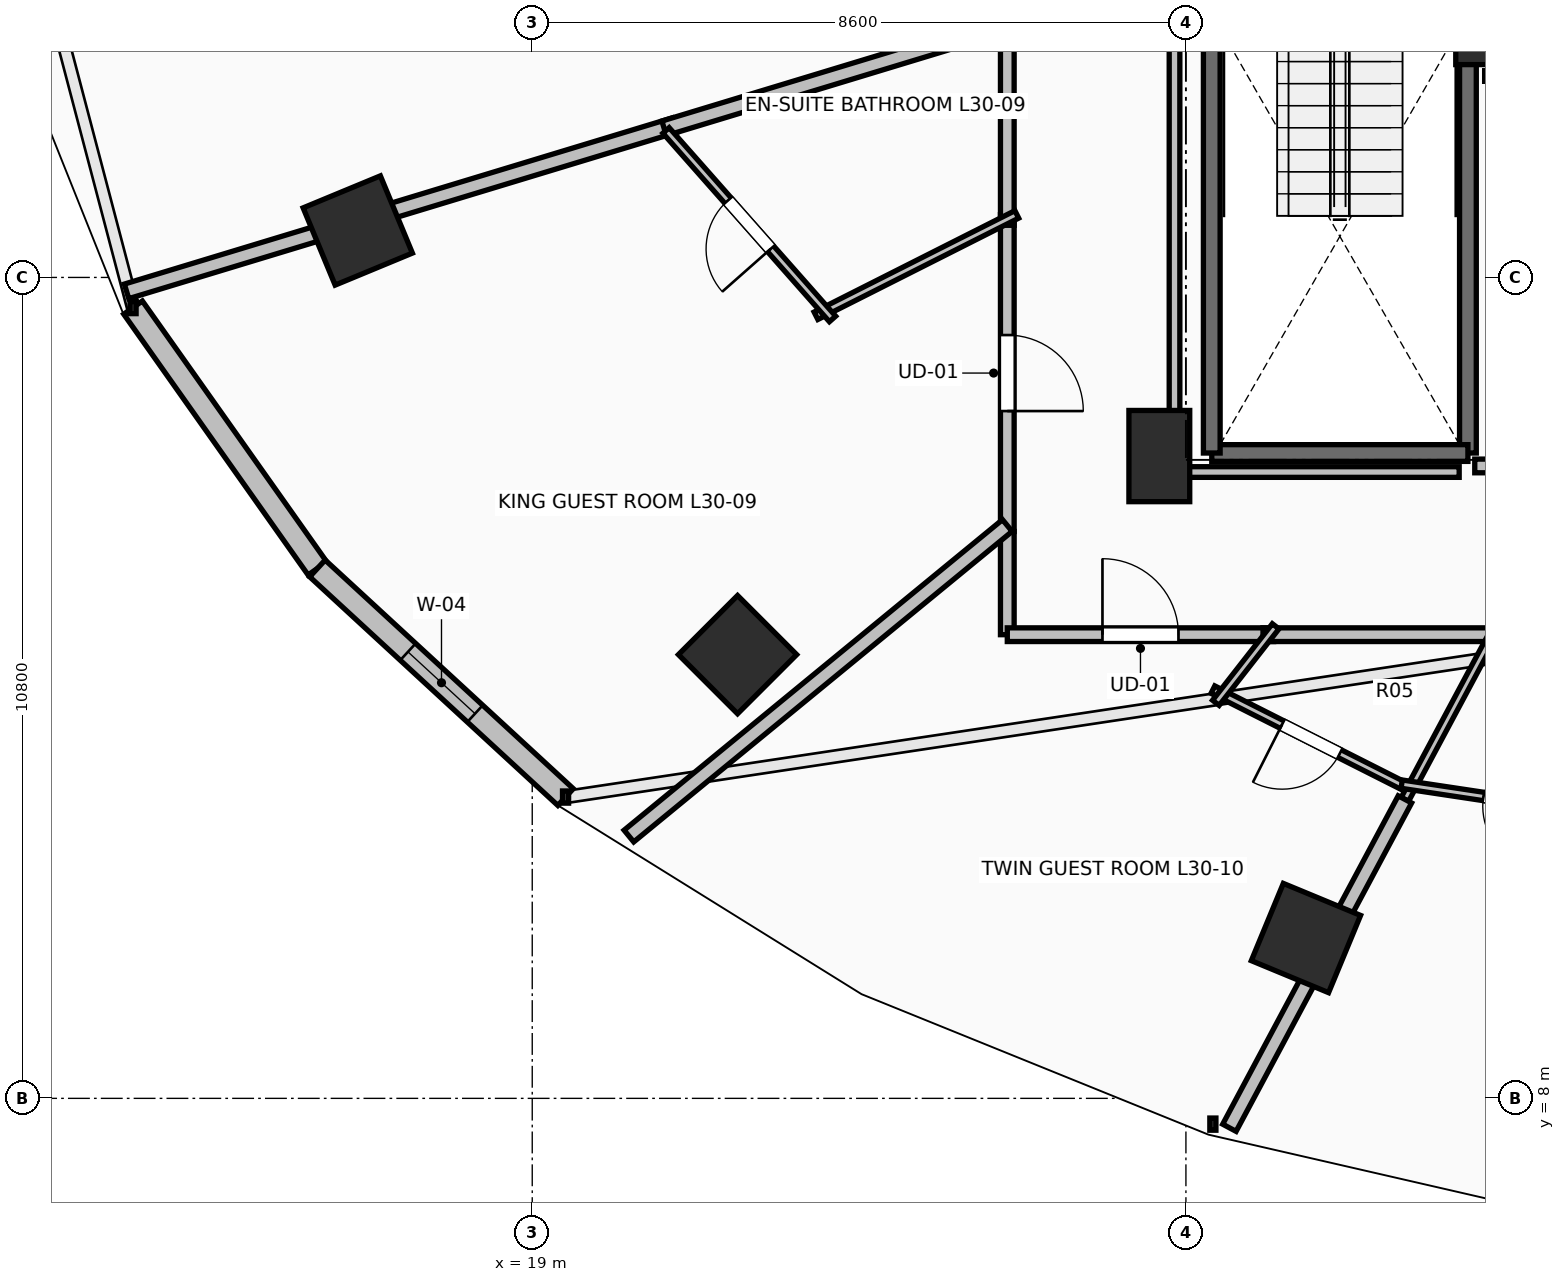
"""IFC4 building model, lengths in metres.
Left out: names, types, materials, properties, quantities, classifications, styles, units other than length and angle.
Written with IfcOpenShell. Run it as: python <this file> out.ifc"""

import sys

from ifc_helpers import new_model, si_unit, direction, frame, frame_2d, origin, origin_2d, place, context, subcontext, project, spatial, rectangle, extrude, element, fill, save


model = new_model("IFC4")
c1 = context("Model", 3, precision=1e-05, world=origin(), true_north=direction((0.0, 1.0)))
c2 = subcontext(c1, "Body", "Model", "MODEL_VIEW")
j1 = project(units=[si_unit("LENGTHUNIT", "METRE"), si_unit("PLANEANGLEUNIT", "RADIAN")], contexts=[c1])
p1 = place(None, origin())
s1 = spatial("IfcSite", under=j1, at=p1, CompositionType="ELEMENT")
p2 = place(p1, origin())
s2 = spatial("IfcBuilding", under=s1, at=p2, CompositionType="ELEMENT")
p3 = place(p2, frame((0.0, 0.0, 113.8)))
s3 = spatial("IfcBuildingStorey", under=s2, at=p3, CompositionType="ELEMENT", Elevation=113.8)
for number, where, z_axis, x_axis in (
    (1, (16.705, 19.418, 0.0), (0.0, 0.0, 1.0), (-0.924, -0.383, 0.0)),
    (2, (21.701, 13.838, 0.0), (0.0, 0.0, 1.0), (-0.707, -0.707, 0.0)),
    (3, (29.179, 10.109, 0.0), (0.0, 0.0, 1.0), (-0.383, -0.924, 0.0)),
):
    element("IfcColumn", number, at=place(p3, frame(where, z_axis=z_axis, x_axis=x_axis)), inside=s3, PredefinedType="COLUMN", context=c2, shape_type="SweptSolid", body=[
        extrude(rectangle(XDim=1.1, YDim=1.1, at=origin_2d()), origin(), (0.0, 0.0, 1.0), 3.5),
    ])
for number, where, z_axis, x_axis in (
    (4, (27.25, 16.45, 0.0), (0.0, 0.0, 1.0), (1.0, 0.0, 0.0)),
    (5, (31.55, 22.2, 0.0), (0.0, 0.0, 1.0), (1.0, 0.0, 0.0)),
):
    element("IfcColumn", number, at=place(p3, frame(where, z_axis=z_axis, x_axis=x_axis)), inside=s3, PredefinedType="PILASTER", context=c2, shape_type="SweptSolid", body=[
        extrude(rectangle(XDim=0.8, YDim=1.2, at=origin_2d()), origin(), (0.0, 0.0, 1.0), 3.5),
    ])
p4 = place(p3, frame((13.748, 18.404, 0.0), z_axis=(0.0, 0.0, 1.0), x_axis=(0.57716435238, -0.81662801222, 0.0)))
e6 = element("IfcWall", 6, at=p4, inside=s3, PredefinedType="STANDARD", context=c2, shape_type="SweptSolid", body=[
    extrude(rectangle(XDim=4.202, YDim=0.3, at=frame_2d((2.101, 0.0))), origin(), (0.0, 0.0, 1.0), 3.24),
])
p5 = place(p3, frame((16.174, 14.972, 0.0), z_axis=(0.0, 0.0, 1.0), x_axis=(0.735416718093, -0.677615119924, 0.0)))
e7 = element("IfcWall", 7, at=p5, inside=s3, PredefinedType="STANDARD", context=c2, shape_type="SweptSolid", body=[
    extrude(rectangle(XDim=4.439, YDim=0.3, at=frame_2d((2.22, 0.0))), origin(), (0.0, 0.0, 1.0), 3.24),
])
p6 = place(p5, frame((1.619, 0.0, 0.85)))
e8 = element("IfcOpeningElement", 8, at=p6, cuts=e7, PredefinedType="OPENING", context=c2, shape_type="SweptSolid", body=[
    extrude(rectangle(XDim=1.2, YDim=1.95, at=frame_2d((0.6, 0.975))), frame((0.0, 0.165, 0.0), z_axis=(0.0, -1.0, 0.0), x_axis=(1.0, 0.0, 0.0)), (0.0, 0.0, 1.0), 0.33),
])
p7 = place(p3, frame((31.31, 23.91, 0.0), z_axis=(0.0, 0.0, 1.0), x_axis=(0.0, -1.0, 0.0)))
e9 = element("IfcWall", 9, at=p7, inside=s3, PredefinedType="SOLIDWALL", context=c2, shape_type="SweptSolid", body=[
    extrude(rectangle(XDim=7.42, YDim=0.22, at=frame_2d((3.71, 0.0))), origin(), (0.0, 0.0, 1.0), 3.24),
])
p8 = place(p3, frame((31.31, 16.49, 0.0), z_axis=(0.0, 0.0, 1.0), x_axis=(-1.0, 0.0, 0.0)))
e10 = element("IfcWall", 10, at=p8, inside=s3, PredefinedType="SOLIDWALL", context=c2, shape_type="SweptSolid", body=[
    extrude(rectangle(XDim=3.37, YDim=0.22, at=frame_2d((1.685, 0.0))), origin(), (0.0, 0.0, 1.0), 3.24),
])
p9 = place(p3, frame((27.94, 16.49, 0.0), z_axis=(0.0, 0.0, 1.0), x_axis=(0.0, 1.0, 0.0)))
e11 = element("IfcWall", 11, at=p9, inside=s3, PredefinedType="SOLIDWALL", context=c2, shape_type="SweptSolid", body=[
    extrude(rectangle(XDim=7.42, YDim=0.22, at=frame_2d((3.71, 0.0))), origin(), (0.0, 0.0, 1.0), 3.24),
])
p10 = place(p3, frame((31.4, 16.32, 0.0), z_axis=(0.0, 0.0, 1.0), x_axis=(1.0, 0.0, 0.0)))
e12 = element("IfcWall", 12, at=p10, inside=s3, PredefinedType="PARTITIONING", context=c2, shape_type="SweptSolid", body=[
    extrude(rectangle(XDim=3.65, YDim=0.18, at=frame_2d((1.825, 0.0))), origin(), (0.0, 0.0, 1.0), 3.24),
])
p11 = place(p10, frame((1.4, 0.0, 0.0)))
e13 = element("IfcOpeningElement", 13, at=p11, cuts=e12, PredefinedType="OPENING", context=c2, shape_type="SweptSolid", body=[
    extrude(rectangle(XDim=0.85, YDim=2.1, at=frame_2d((0.425, 1.05))), frame((0.0, 0.105, 0.0), z_axis=(0.0, -1.0, 0.0), x_axis=(1.0, 0.0, 0.0)), (0.0, 0.0, 1.0), 0.21),
])
p12 = place(p3, frame((25.25, 19.626, 0.0), z_axis=(0.0, 0.0, 1.0), x_axis=(0.0, -1.0, 0.0)))
e14 = element("IfcWall", 14, at=p12, inside=s3, PredefinedType="PARTITIONING", context=c2, shape_type="SweptSolid", body=[
    extrude(rectangle(XDim=4.168, YDim=0.18, at=frame_2d((2.084, 0.0))), origin(), (0.0, 0.0, 1.0), 2.432),
])
p13 = place(p12, frame((1.584, 0.0, 0.0)))
e15 = element("IfcOpeningElement", 15, at=p13, cuts=e14, PredefinedType="OPENING", context=c2, shape_type="SweptSolid", body=[
    extrude(rectangle(XDim=1.0, YDim=2.15, at=frame_2d((0.5, 1.075))), frame((0.0, 0.105, 0.0), z_axis=(0.0, -1.0, 0.0), x_axis=(1.0, 0.0, 0.0)), (0.0, 0.0, 1.0), 0.21),
])
p14 = place(p3, frame((25.25, 22.209, 0.0), z_axis=(0.0, 0.0, 1.0), x_axis=(0.0, -1.0, 0.0)))
e16 = element("IfcWall", 16, at=p14, inside=s3, PredefinedType="PARTITIONING", context=c2, shape_type="SweptSolid", body=[
    extrude(rectangle(XDim=2.723, YDim=0.18, at=frame_2d((1.361, 0.0))), origin(), (0.0, 0.0, 1.0), 3.24),
])
p15 = place(p3, frame((25.25, 15.458, 0.0), z_axis=(0.0, 0.0, 1.0), x_axis=(0.0, -1.0, 0.0)))
e17 = element("IfcWall", 17, at=p15, inside=s3, PredefinedType="PARTITIONING", context=c2, shape_type="SweptSolid", body=[
    extrude(rectangle(XDim=1.358, YDim=0.18, at=frame_2d((0.679, 0.0))), origin(), (0.0, 0.0, 1.0), 2.432),
])
p16 = place(p3, frame((25.25, 14.1, 0.0), z_axis=(0.0, 0.0, 1.0), x_axis=(1.0, 0.0, 0.0)))
e18 = element("IfcWall", 18, at=p16, inside=s3, PredefinedType="PARTITIONING", context=c2, shape_type="SweptSolid", body=[
    extrude(rectangle(XDim=3.504, YDim=0.18, at=frame_2d((1.752, 0.0))), origin(), (0.0, 0.0, 1.0), 2.432),
])
p17 = place(p16, frame((1.252, 0.0, 0.0)))
e19 = element("IfcOpeningElement", 19, at=p17, cuts=e18, PredefinedType="OPENING", context=c2, shape_type="SweptSolid", body=[
    extrude(rectangle(XDim=1.0, YDim=2.15, at=frame_2d((0.5, 1.075))), frame((0.0, 0.105, 0.0), z_axis=(0.0, -1.0, 0.0), x_axis=(1.0, 0.0, 0.0)), (0.0, 0.0, 1.0), 0.21),
])
p18 = place(p3, frame((28.614, 14.1, 0.0), z_axis=(0.0, 0.0, 1.0), x_axis=(1.0, 0.0, 0.0)))
e20 = element("IfcWall", 20, at=p18, inside=s3, PredefinedType="PARTITIONING", context=c2, shape_type="SweptSolid", body=[
    extrude(rectangle(XDim=3.225, YDim=0.18, at=frame_2d((1.613, 0.0))), origin(), (0.0, 0.0, 1.0), 2.929),
])
p19 = place(p3, frame((13.663, 18.617, 0.0), z_axis=(0.0, 0.0, 1.0), x_axis=(0.956933827214, 0.290306132098, 0.0)))
e21 = element("IfcWall", 21, at=p19, inside=s3, PredefinedType="PARTITIONING", context=c2, shape_type="SweptSolid", body=[
    extrude(rectangle(XDim=7.53, YDim=0.2, at=frame_2d((3.765, 0.0))), origin(), (0.0, 0.0, 1.0), 2.886),
])
p20 = place(p3, frame((20.735, 20.762, 0.0), z_axis=(0.0, 0.0, 1.0), x_axis=(0.956916986017, 0.290361639807, 0.0)))
e22 = element("IfcWall", 22, at=p20, inside=s3, PredefinedType="PARTITIONING", context=c2, shape_type="SweptSolid", body=[
    extrude(rectangle(XDim=4.858, YDim=0.2, at=frame_2d((2.429, 0.0))), origin(), (0.0, 0.0, 1.0), 2.929),
])
p21 = place(p3, frame((25.375, 19.629, 0.0), z_axis=(0.0, 0.0, 1.0), x_axis=(-0.892771184856, -0.450510389992, 0.0)))
e23 = element("IfcWall", 23, at=p21, inside=s3, PredefinedType="PARTITIONING", context=c2, shape_type="SweptSolid", body=[
    extrude(rectangle(XDim=2.959, YDim=0.11, at=frame_2d((1.48, 0.0))), origin(), (0.0, 0.0, 1.0), 2.929),
])
p22 = place(p3, frame((22.951, 18.254, 0.0), z_axis=(0.0, 0.0, 1.0), x_axis=(-0.662033979608, 0.749473821988, 0.0)))
e24 = element("IfcWall", 24, at=p22, inside=s3, PredefinedType="PARTITIONING", context=c2, shape_type="SweptSolid", body=[
    extrude(rectangle(XDim=3.309, YDim=0.11, at=frame_2d((1.654, 0.0))), origin(), (0.0, 0.0, 1.0), 3.24),
])
p23 = place(p22, frame((1.229, 0.0, 0.0)))
e25 = element("IfcOpeningElement", 25, at=p23, cuts=e24, PredefinedType="OPENING", context=c2, shape_type="SweptSolid", body=[
    extrude(rectangle(XDim=0.85, YDim=2.1, at=frame_2d((0.425, 1.05))), frame((0.0, 0.07, 0.0), z_axis=(0.0, -1.0, 0.0), x_axis=(1.0, 0.0, 0.0)), (0.0, 0.0, 1.0), 0.14),
])
p24 = place(p3, frame((20.272, 11.451, 0.0), z_axis=(0.0, 0.0, 1.0), x_axis=(0.7730409537, 0.634356117573, 0.0)))
e26 = element("IfcWall", 26, at=p24, inside=s3, PredefinedType="PARTITIONING", context=c2, shape_type="SweptSolid", body=[
    extrude(rectangle(XDim=6.439, YDim=0.2, at=frame_2d((3.22, 0.0))), origin(), (0.0, 0.0, 1.0), 2.432),
])
p25 = place(p3, frame((30.533, 12.075, 0.0), z_axis=(0.0, 0.0, 1.0), x_axis=(-0.89257679281, 0.450895407979, 0.0)))
e27 = element("IfcWall", 27, at=p25, inside=s3, PredefinedType="PARTITIONING", context=c2, shape_type="SweptSolid", body=[
    extrude(rectangle(XDim=2.888, YDim=0.11, at=frame_2d((1.444, 0.0))), origin(), (0.0, 0.0, 1.0), 2.432),
])
p26 = place(p25, frame((1.019, 0.0, 0.0)))
e28 = element("IfcOpeningElement", 28, at=p26, cuts=e27, PredefinedType="OPENING", context=c2, shape_type="SweptSolid", body=[
    extrude(rectangle(XDim=0.85, YDim=2.1, at=frame_2d((0.425, 1.05))), frame((0.0, 0.07, 0.0), z_axis=(0.0, -1.0, 0.0), x_axis=(1.0, 0.0, 0.0)), (0.0, 0.0, 1.0), 0.14),
])
p27 = place(p3, frame((27.994, 13.204, 0.0), z_axis=(0.0, 0.0, 1.0), x_axis=(0.615632914819, 0.788033066687, 0.0)))
e29 = element("IfcWall", 29, at=p27, inside=s3, PredefinedType="PARTITIONING", context=c2, shape_type="SweptSolid", body=[
    extrude(rectangle(XDim=1.277, YDim=0.11, at=frame_2d((0.639, 0.0))), origin(), (0.0, 0.0, 1.0), 2.432),
])
p28 = place(p3, frame((30.481, 11.934, 0.0), z_axis=(0.0, 0.0, 1.0), x_axis=(0.471456709401, 0.881889205718, 0.0)))
e30 = element("IfcWall", 30, at=p28, inside=s3, PredefinedType="PARTITIONING", context=c2, shape_type="SweptSolid", body=[
    extrude(rectangle(XDim=2.596, YDim=0.11, at=frame_2d((1.298, 0.0))), origin(), (0.0, 0.0, 1.0), 2.886),
])
p29 = place(p3, frame((28.172, 7.613, 0.0), z_axis=(0.0, 0.0, 1.0), x_axis=(0.47136925097, 0.881935955294, 0.0)))
e31 = element("IfcWall", 31, at=p29, inside=s3, PredefinedType="PARTITIONING", context=c2, shape_type="SweptSolid", body=[
    extrude(rectangle(XDim=4.899, YDim=0.2, at=frame_2d((2.449, 0.0))), origin(), (0.0, 0.0, 1.0), 2.677),
])
p30 = place(p3, frame((33.431, 11.683, 0.0), z_axis=(0.0, 0.0, 1.0), x_axis=(-0.988849795555, 0.148916358508, 0.0)))
e32 = element("IfcWall", 32, at=p30, inside=s3, PredefinedType="PARTITIONING", context=c2, shape_type="SweptSolid", body=[
    extrude(rectangle(XDim=3.026, YDim=0.11, at=frame_2d((1.513, 0.0))), origin(), (0.0, 0.0, 1.0), 2.886),
])
p31 = place(p30, frame((1.088, 0.0, 0.0)))
e33 = element("IfcOpeningElement", 33, at=p31, cuts=e32, PredefinedType="OPENING", context=c2, shape_type="SweptSolid", body=[
    extrude(rectangle(XDim=0.85, YDim=2.1, at=frame_2d((0.425, 1.05))), frame((0.0, 0.07, 0.0), z_axis=(0.0, -1.0, 0.0), x_axis=(1.0, 0.0, 0.0)), (0.0, 0.0, 1.0), 0.14),
])
p32 = place(p3, frame((34.83, 21.45, 0.0), z_axis=(0.0, 0.0, 1.0), x_axis=(-1.0, 0.0, 0.0)))
e34 = element("IfcWall", 34, at=p32, inside=s3, PredefinedType="PARTITIONING", context=c2, shape_type="SweptSolid", body=[
    extrude(rectangle(XDim=3.3, YDim=0.14, at=frame_2d((1.65, 0.0))), origin(), (0.0, 0.0, 1.0), 3.24),
])
p33 = place(p3, frame((31.195, 16.24, 0.0), z_axis=(0.0, 0.0, 1.0), x_axis=(-1.0, 0.0, 0.0)))
e35 = element("IfcWall", 35, at=p33, inside=s3, PredefinedType="PARTITIONING", context=c2, shape_type="SweptSolid", body=[
    extrude(rectangle(XDim=3.745, YDim=0.14, at=frame_2d((1.873, 0.0))), origin(), (0.0, 0.0, 1.0), 2.432),
])
p34 = place(p3, frame((27.45, 16.24, 0.0), z_axis=(0.0, 0.0, 1.0), x_axis=(0.0, 1.0, 0.0)))
e36 = element("IfcWall", 36, at=p34, inside=s3, PredefinedType="PARTITIONING", context=c2, shape_type="SweptSolid", body=[
    extrude(rectangle(XDim=7.514, YDim=0.14, at=frame_2d((3.757, 0.0))), origin(), (0.0, 0.0, 1.0), 2.432),
])
p35 = place(p6, origin())
e37 = element("IfcWindow", 37, at=p35, inside=s3, PartitioningType="SINGLE_PANEL", PredefinedType="WINDOW", context=c2, shape_type="SweptSolid", body=[
    extrude(rectangle(XDim=1.2, YDim=1.95, at=frame_2d((0.6, 0.975))), frame((0.0, 0.03, 0.0), z_axis=(0.0, -1.0, 0.0), x_axis=(1.0, 0.0, 0.0)), (0.0, 0.0, 1.0), 0.06),
])
fill(e8, e37)
p36 = place(p13, origin())
e38 = element("IfcDoor", 38, at=p36, inside=s3, OperationType="SINGLE_SWING_RIGHT", PredefinedType="DOOR", context=c2, shape_type="SweptSolid", body=[
    extrude(rectangle(XDim=1.0, YDim=2.15, at=frame_2d((0.5, 1.075))), frame((0.0, 0.025, 0.0), z_axis=(0.0, -1.0, 0.0), x_axis=(1.0, 0.0, 0.0)), (0.0, 0.0, 1.0), 0.05),
])
fill(e15, e38)
p37 = place(p17, origin())
e39 = element("IfcDoor", 39, at=p37, inside=s3, OperationType="SINGLE_SWING_LEFT", PredefinedType="DOOR", context=c2, shape_type="SweptSolid", body=[
    extrude(rectangle(XDim=1.0, YDim=2.15, at=frame_2d((0.5, 1.075))), frame((0.0, 0.025, 0.0), z_axis=(0.0, -1.0, 0.0), x_axis=(1.0, 0.0, 0.0)), (0.0, 0.0, 1.0), 0.05),
])
fill(e19, e39)
p38 = place(p23, origin())
e40 = element("IfcDoor", 40, at=p38, inside=s3, OperationType="SINGLE_SWING_LEFT", PredefinedType="DOOR", context=c2, shape_type="SweptSolid", body=[
    extrude(rectangle(XDim=0.85, YDim=2.1, at=frame_2d((0.425, 1.05))), frame((0.0, 0.025, 0.0), z_axis=(0.0, -1.0, 0.0), x_axis=(1.0, 0.0, 0.0)), (0.0, 0.0, 1.0), 0.05),
])
fill(e25, e40)
p39 = place(p26, origin())
e41 = element("IfcDoor", 41, at=p39, inside=s3, OperationType="SINGLE_SWING_RIGHT", PredefinedType="DOOR", context=c2, shape_type="SweptSolid", body=[
    extrude(rectangle(XDim=0.85, YDim=2.1, at=frame_2d((0.425, 1.05))), frame((0.0, 0.025, 0.0), z_axis=(0.0, -1.0, 0.0), x_axis=(1.0, 0.0, 0.0)), (0.0, 0.0, 1.0), 0.05),
])
fill(e28, e41)
p40 = place(p31, origin())
e42 = element("IfcDoor", 42, at=p40, inside=s3, OperationType="SINGLE_SWING_LEFT", PredefinedType="DOOR", context=c2, shape_type="SweptSolid", body=[
    extrude(rectangle(XDim=0.85, YDim=2.1, at=frame_2d((0.425, 1.05))), frame((0.0, 0.025, 0.0), z_axis=(0.0, -1.0, 0.0), x_axis=(1.0, 0.0, 0.0)), (0.0, 0.0, 1.0), 0.05),
])
fill(e33, e42)
save(model, sys.argv[1])
